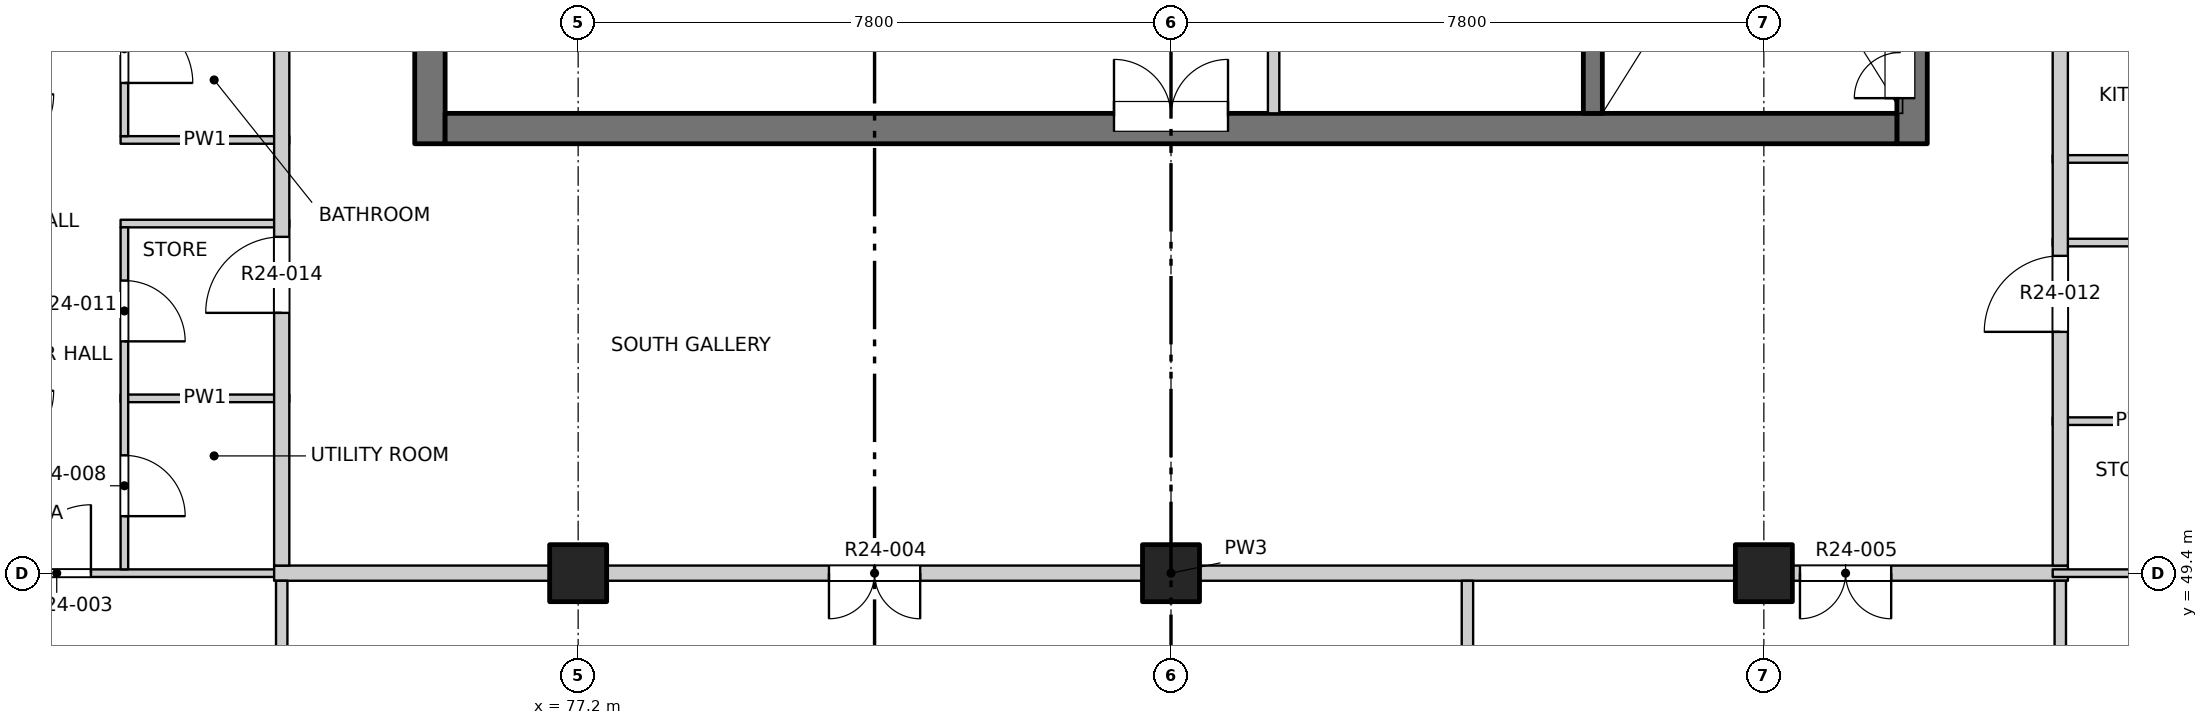
"""IFC4 building model, lengths in metres.
Left out: names, types, materials, properties, quantities, classifications, styles, units other than length and angle.
Written with IfcOpenShell. Run it as: python <this file> out.ifc"""

import sys

from ifc_helpers import new_model, si_unit, direction, frame, frame_2d, origin, origin_2d, place, context, subcontext, project, spatial, rectangle, extrude, element, fill, save


model = new_model("IFC4")
c1 = context("Model", 3, precision=1e-05, world=origin(), true_north=direction((0.0, 1.0)))
c2 = subcontext(c1, "Body", "Model", "MODEL_VIEW")
j1 = project(units=[si_unit("LENGTHUNIT", "METRE"), si_unit("PLANEANGLEUNIT", "RADIAN")], contexts=[c1])
p1 = place(None, origin())
s1 = spatial("IfcSite", under=j1, at=p1, CompositionType="ELEMENT")
p2 = place(p1, origin())
s2 = spatial("IfcBuilding", under=s1, at=p2, CompositionType="ELEMENT")
p3 = place(p2, frame((0.0, 0.0, 249.4)))
s3 = spatial("IfcBuildingStorey", under=s2, at=p3, CompositionType="ELEMENT", Elevation=249.4)
for number, where, z_axis, x_axis in (
    (1, (77.2, 49.4, -0.25), (0.0, 0.0, 1.0), (1.0, 0.0, 0.0)),
    (2, (85.0, 49.4, -0.25), (0.0, 0.0, 1.0), (1.0, 0.0, 0.0)),
    (3, (92.8, 49.4, -0.25), (0.0, 0.0, 1.0), (1.0, 0.0, 0.0)),
):
    element("IfcColumn", number, at=place(p3, frame(where, z_axis=z_axis, x_axis=x_axis)), inside=s3, PredefinedType="COLUMN", context=c2, shape_type="SweptSolid", body=[
        extrude(rectangle(XDim=0.75, YDim=0.75, at=origin_2d()), origin(), (0.0, 0.0, 1.0), 3.4),
    ])
p4 = place(p3, frame((75.25, 55.05, -0.25), z_axis=(0.0, 0.0, 1.0), x_axis=(0.0, 1.0, 0.0)))
e4 = element("IfcWall", 4, at=p4, inside=s3, PredefinedType="SOLIDWALL", context=c2, shape_type="SweptSolid", body=[
    extrude(rectangle(XDim=22.25, YDim=0.4, at=frame_2d((11.125, 0.0))), origin(), (0.0, 0.0, 1.0), 3.4),
])
p5 = place(p4, frame((7.4, 0.0, 0.25)))
e5 = element("IfcOpeningElement", 5, at=p5, cuts=e4, PredefinedType="OPENING", context=c2, shape_type="SweptSolid", body=[
    extrude(rectangle(XDim=0.9, YDim=2.1, at=frame_2d((0.45, 1.05))), frame((0.0, 0.21, 0.0), z_axis=(0.0, -1.0, 0.0), x_axis=(1.0, 0.0, 0.0)), (0.0, 0.0, 1.0), 0.42),
])
p6 = place(p4, frame((12.05, 0.0, 0.25)))
e6 = element("IfcOpeningElement", 6, at=p6, cuts=e4, PredefinedType="OPENING", context=c2, shape_type="SweptSolid", body=[
    extrude(rectangle(XDim=0.9, YDim=2.1, at=frame_2d((0.45, 1.05))), frame((0.0, 0.21, 0.0), z_axis=(0.0, -1.0, 0.0), x_axis=(1.0, 0.0, 0.0)), (0.0, 0.0, 1.0), 0.42),
])
p7 = place(p4, frame((16.55, 0.0, 0.25)))
e7 = element("IfcOpeningElement", 7, at=p7, cuts=e4, PredefinedType="OPENING", context=c2, shape_type="SweptSolid", body=[
    extrude(rectangle(XDim=0.9, YDim=2.1, at=frame_2d((0.45, 1.05))), frame((0.0, 0.21, 0.0), z_axis=(0.0, -1.0, 0.0), x_axis=(1.0, 0.0, 0.0)), (0.0, 0.0, 1.0), 0.42),
])
p8 = place(p4, frame((20.0, 0.0, 0.25)))
e8 = element("IfcOpeningElement", 8, at=p8, cuts=e4, PredefinedType="OPENING", context=c2, shape_type="SweptSolid", body=[
    extrude(rectangle(XDim=0.9, YDim=2.1, at=frame_2d((0.45, 1.05))), frame((0.0, 0.21, 0.0), z_axis=(0.0, -1.0, 0.0), x_axis=(1.0, 0.0, 0.0)), (0.0, 0.0, 1.0), 0.42),
])
p9 = place(p3, frame((94.75, 55.05, -0.25), z_axis=(0.0, 0.0, 1.0), x_axis=(0.0, 1.0, 0.0)))
e9 = element("IfcWall", 9, at=p9, inside=s3, PredefinedType="SOLIDWALL", context=c2, shape_type="SweptSolid", body=[
    extrude(rectangle(XDim=6.9, YDim=0.4, at=frame_2d((3.45, 0.0))), origin(), (0.0, 0.0, 1.0), 3.4),
])
p10 = place(p9, frame((0.6, 0.0, 0.25)))
e10 = element("IfcOpeningElement", 10, at=p10, cuts=e9, PredefinedType="OPENING", context=c2, shape_type="SweptSolid", body=[
    extrude(rectangle(XDim=1.2, YDim=2.1, at=frame_2d((0.6, 1.05))), frame((0.0, 0.21, 0.0), z_axis=(0.0, -1.0, 0.0), x_axis=(1.0, 0.0, 0.0)), (0.0, 0.0, 1.0), 0.42),
])
p11 = place(p3, frame((75.45, 55.25, -0.25), z_axis=(0.0, 0.0, 1.0), x_axis=(1.0, 0.0, 0.0)))
e11 = element("IfcWall", 11, at=p11, inside=s3, PredefinedType="SOLIDWALL", context=c2, shape_type="SweptSolid", body=[
    extrude(rectangle(XDim=19.1, YDim=0.4, at=frame_2d((9.55, 0.0))), origin(), (0.0, 0.0, 1.0), 3.4),
])
p12 = place(p11, frame((8.8, 0.0, 0.25)))
e12 = element("IfcOpeningElement", 12, at=p12, cuts=e11, PredefinedType="OPENING", context=c2, shape_type="SweptSolid", body=[
    extrude(rectangle(XDim=1.5, YDim=2.1, at=frame_2d((0.75, 1.05))), frame((0.0, 0.21, 0.0), z_axis=(0.0, -1.0, 0.0), x_axis=(1.0, 0.0, 0.0)), (0.0, 0.0, 1.0), 0.42),
])
p13 = place(p3, frame((90.55, 55.45, -0.25), z_axis=(0.0, 0.0, 1.0), x_axis=(0.0, 1.0, 0.0)))
e13 = element("IfcWall", 13, at=p13, inside=s3, PredefinedType="SOLIDWALL", context=c2, shape_type="SweptSolid", body=[
    extrude(rectangle(XDim=6.5, YDim=0.25, at=frame_2d((3.25, 0.0))), origin(), (0.0, 0.0, 1.0), 3.4),
])
p14 = place(p3, frame((65.8, 49.4, 0.0), z_axis=(0.0, 0.0, 1.0), x_axis=(1.0, 0.0, 0.0)))
e14 = element("IfcWall", 14, at=p14, inside=s3, PredefinedType="PARTITIONING", context=c2, shape_type="SweptSolid", body=[
    extrude(rectangle(XDim=7.6, YDim=0.1, at=frame_2d((3.8, 0.0))), origin(), (0.0, 0.0, 1.0), 3.15),
])
p15 = place(p14, frame((4.09, 0.0, 0.0)))
e15 = element("IfcOpeningElement", 15, at=p15, cuts=e14, PredefinedType="OPENING", context=c2, shape_type="SweptSolid", body=[
    extrude(rectangle(XDim=0.9, YDim=2.1, at=frame_2d((0.45, 1.05))), frame((0.0, 0.06, 0.0), z_axis=(0.0, -1.0, 0.0), x_axis=(1.0, 0.0, 0.0)), (0.0, 0.0, 1.0), 0.12),
])
p16 = place(p3, frame((73.2, 49.4, 0.0), z_axis=(0.0, 0.0, 1.0), x_axis=(1.0, 0.0, 0.0)))
e16 = element("IfcWall", 16, at=p16, inside=s3, PredefinedType="PARTITIONING", context=c2, shape_type="SweptSolid", body=[
    extrude(rectangle(XDim=23.6, YDim=0.2, at=frame_2d((11.8, 0.0))), origin(), (0.0, 0.0, 1.0), 3.15),
])
p17 = place(p16, frame((7.3, 0.0, 0.0)))
e17 = element("IfcOpeningElement", 17, at=p17, cuts=e16, PredefinedType="OPENING", context=c2, shape_type="SweptSolid", body=[
    extrude(rectangle(XDim=1.2, YDim=2.1, at=frame_2d((0.6, 1.05))), frame((0.0, 0.11, 0.0), z_axis=(0.0, -1.0, 0.0), x_axis=(1.0, 0.0, 0.0)), (0.0, 0.0, 1.0), 0.22),
])
p18 = place(p16, frame((20.075, 0.0, 0.0)))
e18 = element("IfcOpeningElement", 18, at=p18, cuts=e16, PredefinedType="OPENING", context=c2, shape_type="SweptSolid", body=[
    extrude(rectangle(XDim=1.2, YDim=2.1, at=frame_2d((0.6, 1.05))), frame((0.0, 0.11, 0.0), z_axis=(0.0, -1.0, 0.0), x_axis=(1.0, 0.0, 0.0)), (0.0, 0.0, 1.0), 0.22),
])
p19 = place(p3, frame((96.6, 49.4, 0.0), z_axis=(0.0, 0.0, 1.0), x_axis=(1.0, 0.0, 0.0)))
e19 = element("IfcWall", 19, at=p19, inside=s3, PredefinedType="PARTITIONING", context=c2, shape_type="SweptSolid", body=[
    extrude(rectangle(XDim=7.6, YDim=0.1, at=frame_2d((3.8, 0.0))), origin(), (0.0, 0.0, 1.0), 3.15),
])
p20 = place(p19, frame((2.61, 0.0, 0.0)))
e20 = element("IfcOpeningElement", 20, at=p20, cuts=e19, PredefinedType="OPENING", context=c2, shape_type="SweptSolid", body=[
    extrude(rectangle(XDim=0.9, YDim=2.1, at=frame_2d((0.45, 1.05))), frame((0.0, 0.06, 0.0), z_axis=(0.0, -1.0, 0.0), x_axis=(1.0, 0.0, 0.0)), (0.0, 0.0, 1.0), 0.12),
])
for number, where, z_axis, x_axis in (
    (21, (96.6, 51.4, 0.0), (0.0, 0.0, 1.0), (1.0, 0.0, 0.0)),
    (22, (71.18, 51.7, 0.0), (0.0, 0.0, 1.0), (1.0, 0.0, 0.0)),
    (23, (96.6, 53.75, 0.0), (0.0, 0.0, 1.0), (1.0, 0.0, 0.0)),
    (24, (71.18, 54.0, 0.0), (0.0, 0.0, 1.0), (1.0, 0.0, 0.0)),
    (25, (96.6, 54.85, 0.0), (0.0, 0.0, 1.0), (1.0, 0.0, 0.0)),
    (26, (71.18, 55.1, 0.0), (0.0, 0.0, 1.0), (1.0, 0.0, 0.0)),
):
    element("IfcWall", number, at=place(p3, frame(where, z_axis=z_axis, x_axis=x_axis)), inside=s3, PredefinedType="PARTITIONING", context=c2, shape_type="SweptSolid", body=[
        extrude(rectangle(XDim=2.22, YDim=0.1, at=frame_2d((1.11, 0.0))), origin(), (0.0, 0.0, 1.0), 3.15),
    ])
p21 = place(p3, frame((71.23, 49.45, 0.0), z_axis=(0.0, 0.0, 1.0), x_axis=(0.0, 1.0, 0.0)))
e27 = element("IfcWall", 27, at=p21, inside=s3, PredefinedType="PARTITIONING", context=c2, shape_type="SweptSolid", body=[
    extrude(rectangle(XDim=4.5, YDim=0.1, at=frame_2d((2.25, 0.0))), origin(), (0.0, 0.0, 1.0), 3.15),
])
p22 = place(p21, frame((0.7, 0.0, 0.0)))
e28 = element("IfcOpeningElement", 28, at=p22, cuts=e27, PredefinedType="OPENING", context=c2, shape_type="SweptSolid", body=[
    extrude(rectangle(XDim=0.8, YDim=2.1, at=frame_2d((0.4, 1.05))), frame((0.0, 0.06, 0.0), z_axis=(0.0, -1.0, 0.0), x_axis=(1.0, 0.0, 0.0)), (0.0, 0.0, 1.0), 0.12),
])
p23 = place(p21, frame((3.0, 0.0, 0.0)))
e29 = element("IfcOpeningElement", 29, at=p23, cuts=e27, PredefinedType="OPENING", context=c2, shape_type="SweptSolid", body=[
    extrude(rectangle(XDim=0.8, YDim=2.1, at=frame_2d((0.4, 1.05))), frame((0.0, 0.06, 0.0), z_axis=(0.0, -1.0, 0.0), x_axis=(1.0, 0.0, 0.0)), (0.0, 0.0, 1.0), 0.12),
])
p24 = place(p3, frame((71.23, 55.15, 0.0), z_axis=(0.0, 0.0, 1.0), x_axis=(0.0, 1.0, 0.0)))
e30 = element("IfcWall", 30, at=p24, inside=s3, PredefinedType="PARTITIONING", context=c2, shape_type="SweptSolid", body=[
    extrude(rectangle(XDim=10.9, YDim=0.1, at=frame_2d((5.45, 0.0))), origin(), (0.0, 0.0, 1.0), 3.15),
])
p25 = place(p24, frame((0.7, 0.0, 0.0)))
e31 = element("IfcOpeningElement", 31, at=p25, cuts=e30, PredefinedType="OPENING", context=c2, shape_type="SweptSolid", body=[
    extrude(rectangle(XDim=0.9, YDim=2.1, at=frame_2d((0.45, 1.05))), frame((0.0, 0.06, 0.0), z_axis=(0.0, -1.0, 0.0), x_axis=(1.0, 0.0, 0.0)), (0.0, 0.0, 1.0), 0.12),
])
p26 = place(p24, frame((2.815, 0.0, 0.0)))
e32 = element("IfcOpeningElement", 32, at=p26, cuts=e30, PredefinedType="OPENING", context=c2, shape_type="SweptSolid", body=[
    extrude(rectangle(XDim=0.9, YDim=2.1, at=frame_2d((0.45, 1.05))), frame((0.0, 0.06, 0.0), z_axis=(0.0, -1.0, 0.0), x_axis=(1.0, 0.0, 0.0)), (0.0, 0.0, 1.0), 0.12),
])
p27 = place(p24, frame((5.005, 0.0, 0.0)))
e33 = element("IfcOpeningElement", 33, at=p27, cuts=e30, PredefinedType="OPENING", context=c2, shape_type="SweptSolid", body=[
    extrude(rectangle(XDim=0.8, YDim=2.1, at=frame_2d((0.4, 1.05))), frame((0.0, 0.06, 0.0), z_axis=(0.0, -1.0, 0.0), x_axis=(1.0, 0.0, 0.0)), (0.0, 0.0, 1.0), 0.12),
])
p28 = place(p24, frame((7.79, 0.0, 0.0)))
e34 = element("IfcOpeningElement", 34, at=p28, cuts=e30, PredefinedType="OPENING", context=c2, shape_type="SweptSolid", body=[
    extrude(rectangle(XDim=0.9, YDim=2.1, at=frame_2d((0.45, 1.05))), frame((0.0, 0.06, 0.0), z_axis=(0.0, -1.0, 0.0), x_axis=(1.0, 0.0, 0.0)), (0.0, 0.0, 1.0), 0.12),
])
p29 = place(p24, frame((10.0, 0.0, 0.0)))
e35 = element("IfcOpeningElement", 35, at=p29, cuts=e30, PredefinedType="OPENING", context=c2, shape_type="SweptSolid", body=[
    extrude(rectangle(XDim=0.8, YDim=2.1, at=frame_2d((0.4, 1.05))), frame((0.0, 0.06, 0.0), z_axis=(0.0, -1.0, 0.0), x_axis=(1.0, 0.0, 0.0)), (0.0, 0.0, 1.0), 0.12),
])
p30 = place(p3, frame((73.3, 45.8, 0.0), z_axis=(0.0, 0.0, 1.0), x_axis=(0.0, 1.0, 0.0)))
e36 = element("IfcWall", 36, at=p30, inside=s3, PredefinedType="PARTITIONING", context=c2, shape_type="SweptSolid", body=[
    extrude(rectangle(XDim=3.5, YDim=0.15, at=frame_2d((1.75, 0.0))), origin(), (0.0, 0.0, 1.0), 3.15),
])
p31 = place(p3, frame((73.3, 49.5, 0.0), z_axis=(0.0, 0.0, 1.0), x_axis=(0.0, 1.0, 0.0)))
e37 = element("IfcWall", 37, at=p31, inside=s3, PredefinedType="PARTITIONING", context=c2, shape_type="SweptSolid", body=[
    extrude(rectangle(XDim=34.7, YDim=0.2, at=frame_2d((17.35, 0.0))), origin(), (0.0, 0.0, 1.0), 3.15),
])
p32 = place(p31, frame((3.325, 0.0, 0.0)))
e38 = element("IfcOpeningElement", 38, at=p32, cuts=e37, PredefinedType="OPENING", context=c2, shape_type="SweptSolid", body=[
    extrude(rectangle(XDim=1.0, YDim=2.1, at=frame_2d((0.5, 1.05))), frame((0.0, 0.11, 0.0), z_axis=(0.0, -1.0, 0.0), x_axis=(1.0, 0.0, 0.0)), (0.0, 0.0, 1.0), 0.22),
])
p33 = place(p31, frame((17.875, 0.0, 0.0)))
e39 = element("IfcOpeningElement", 39, at=p33, cuts=e37, PredefinedType="OPENING", context=c2, shape_type="SweptSolid", body=[
    extrude(rectangle(XDim=1.0, YDim=2.1, at=frame_2d((0.5, 1.05))), frame((0.0, 0.11, 0.0), z_axis=(0.0, -1.0, 0.0), x_axis=(1.0, 0.0, 0.0)), (0.0, 0.0, 1.0), 0.22),
])
p34 = place(p31, frame((25.775, 0.0, 0.0)))
e40 = element("IfcOpeningElement", 40, at=p34, cuts=e37, PredefinedType="OPENING", context=c2, shape_type="SweptSolid", body=[
    extrude(rectangle(XDim=1.0, YDim=2.1, at=frame_2d((0.5, 1.05))), frame((0.0, 0.11, 0.0), z_axis=(0.0, -1.0, 0.0), x_axis=(1.0, 0.0, 0.0)), (0.0, 0.0, 1.0), 0.22),
])
p35 = place(p3, frame((86.35, 55.45, 0.0), z_axis=(0.0, 0.0, 1.0), x_axis=(0.0, 1.0, 0.0)))
e41 = element("IfcWall", 41, at=p35, inside=s3, PredefinedType="PARTITIONING", context=c2, shape_type="SweptSolid", body=[
    extrude(rectangle(XDim=5.575, YDim=0.15, at=frame_2d((2.788, 0.0))), origin(), (0.0, 0.0, 1.0), 3.15),
])
p36 = place(p35, frame((2.25, 0.0, 0.0)))
e42 = element("IfcOpeningElement", 42, at=p36, cuts=e41, PredefinedType="OPENING", context=c2, shape_type="SweptSolid", body=[
    extrude(rectangle(XDim=0.9, YDim=2.1, at=frame_2d((0.45, 1.05))), frame((0.0, 0.085, 0.0), z_axis=(0.0, -1.0, 0.0), x_axis=(1.0, 0.0, 0.0)), (0.0, 0.0, 1.0), 0.17),
])
p37 = place(p3, frame((88.9, 45.8, 0.0), z_axis=(0.0, 0.0, 1.0), x_axis=(0.0, 1.0, 0.0)))
e43 = element("IfcWall", 43, at=p37, inside=s3, PredefinedType="PARTITIONING", context=c2, shape_type="SweptSolid", body=[
    extrude(rectangle(XDim=3.5, YDim=0.15, at=frame_2d((1.75, 0.0))), origin(), (0.0, 0.0, 1.0), 2.55),
])
p38 = place(p3, frame((96.7, 45.8, 0.0), z_axis=(0.0, 0.0, 1.0), x_axis=(0.0, 1.0, 0.0)))
e44 = element("IfcWall", 44, at=p38, inside=s3, PredefinedType="PARTITIONING", context=c2, shape_type="SweptSolid", body=[
    extrude(rectangle(XDim=3.5, YDim=0.15, at=frame_2d((1.75, 0.0))), origin(), (0.0, 0.0, 1.0), 3.15),
])
p39 = place(p3, frame((96.7, 49.5, 0.0), z_axis=(0.0, 0.0, 1.0), x_axis=(0.0, 1.0, 0.0)))
e45 = element("IfcWall", 45, at=p39, inside=s3, PredefinedType="PARTITIONING", context=c2, shape_type="SweptSolid", body=[
    extrude(rectangle(XDim=34.7, YDim=0.2, at=frame_2d((17.35, 0.0))), origin(), (0.0, 0.0, 1.0), 3.15),
])
p40 = place(p39, frame((3.075, 0.0, 0.0)))
e46 = element("IfcOpeningElement", 46, at=p40, cuts=e45, PredefinedType="OPENING", context=c2, shape_type="SweptSolid", body=[
    extrude(rectangle(XDim=1.0, YDim=2.1, at=frame_2d((0.5, 1.05))), frame((0.0, 0.11, 0.0), z_axis=(0.0, -1.0, 0.0), x_axis=(1.0, 0.0, 0.0)), (0.0, 0.0, 1.0), 0.22),
])
p41 = place(p39, frame((18.425, 0.0, 0.0)))
e47 = element("IfcOpeningElement", 47, at=p41, cuts=e45, PredefinedType="OPENING", context=c2, shape_type="SweptSolid", body=[
    extrude(rectangle(XDim=1.0, YDim=2.1, at=frame_2d((0.5, 1.05))), frame((0.0, 0.11, 0.0), z_axis=(0.0, -1.0, 0.0), x_axis=(1.0, 0.0, 0.0)), (0.0, 0.0, 1.0), 0.22),
])
p42 = place(p39, frame((25.825, 0.0, 0.0)))
e48 = element("IfcOpeningElement", 48, at=p42, cuts=e45, PredefinedType="OPENING", context=c2, shape_type="SweptSolid", body=[
    extrude(rectangle(XDim=1.0, YDim=2.1, at=frame_2d((0.5, 1.05))), frame((0.0, 0.11, 0.0), z_axis=(0.0, -1.0, 0.0), x_axis=(1.0, 0.0, 0.0)), (0.0, 0.0, 1.0), 0.22),
])
p43 = place(p15, origin())
e49 = element("IfcDoor", 49, at=p43, inside=s3, OperationType="SINGLE_SWING_RIGHT", PredefinedType="DOOR", context=c2, shape_type="SweptSolid", body=[
    extrude(rectangle(XDim=0.9, YDim=2.1, at=frame_2d((0.45, 1.05))), frame((0.0, 0.025, 0.0), z_axis=(0.0, -1.0, 0.0), x_axis=(1.0, 0.0, 0.0)), (0.0, 0.0, 1.0), 0.05),
])
fill(e15, e49)
p44 = place(p17, origin())
e50 = element("IfcDoor", 50, at=p44, inside=s3, OperationType="DOUBLE_DOOR_SINGLE_SWING", PredefinedType="DOOR", context=c2, shape_type="SweptSolid", body=[
    extrude(rectangle(XDim=1.2, YDim=2.1, at=frame_2d((0.6, 1.05))), frame((0.0, 0.025, 0.0), z_axis=(0.0, -1.0, 0.0), x_axis=(1.0, 0.0, 0.0)), (0.0, 0.0, 1.0), 0.05),
])
fill(e17, e50)
p45 = place(p18, origin())
e51 = element("IfcDoor", 51, at=p45, inside=s3, OperationType="DOUBLE_DOOR_SINGLE_SWING", PredefinedType="DOOR", context=c2, shape_type="SweptSolid", body=[
    extrude(rectangle(XDim=1.2, YDim=2.1, at=frame_2d((0.6, 1.05))), frame((0.0, 0.025, 0.0), z_axis=(0.0, -1.0, 0.0), x_axis=(1.0, 0.0, 0.0)), (0.0, 0.0, 1.0), 0.05),
])
fill(e18, e51)
p46 = place(p22, origin())
e52 = element("IfcDoor", 52, at=p46, inside=s3, OperationType="SINGLE_SWING_RIGHT", PredefinedType="DOOR", context=c2, shape_type="SweptSolid", body=[
    extrude(rectangle(XDim=0.8, YDim=2.1, at=frame_2d((0.4, 1.05))), frame((0.0, 0.025, 0.0), z_axis=(0.0, -1.0, 0.0), x_axis=(1.0, 0.0, 0.0)), (0.0, 0.0, 1.0), 0.05),
])
fill(e28, e52)
p47 = place(p23, origin())
e53 = element("IfcDoor", 53, at=p47, inside=s3, OperationType="SINGLE_SWING_RIGHT", PredefinedType="DOOR", context=c2, shape_type="SweptSolid", body=[
    extrude(rectangle(XDim=0.8, YDim=2.1, at=frame_2d((0.4, 1.05))), frame((0.0, 0.025, 0.0), z_axis=(0.0, -1.0, 0.0), x_axis=(1.0, 0.0, 0.0)), (0.0, 0.0, 1.0), 0.05),
])
fill(e29, e53)
p48 = place(p40, origin())
e54 = element("IfcDoor", 54, at=p48, inside=s3, OperationType="SINGLE_SWING_RIGHT", PredefinedType="DOOR", context=c2, shape_type="SweptSolid", body=[
    extrude(rectangle(XDim=1.0, YDim=2.1, at=frame_2d((0.5, 1.05))), frame((0.0, 0.025, 0.0), z_axis=(0.0, -1.0, 0.0), x_axis=(1.0, 0.0, 0.0)), (0.0, 0.0, 1.0), 0.05),
])
fill(e46, e54)
p49 = place(p32, origin())
e55 = element("IfcDoor", 55, at=p49, inside=s3, OperationType="SINGLE_SWING_LEFT", PredefinedType="DOOR", context=c2, shape_type="SweptSolid", body=[
    extrude(rectangle(XDim=1.0, YDim=2.1, at=frame_2d((0.5, 1.05))), frame((0.0, 0.025, 0.0), z_axis=(0.0, -1.0, 0.0), x_axis=(1.0, 0.0, 0.0)), (0.0, 0.0, 1.0), 0.05),
])
fill(e38, e55)
p50 = place(p12, origin())
e56 = element("IfcDoor", 56, at=p50, inside=s3, OperationType="DOUBLE_DOOR_SINGLE_SWING", PredefinedType="DOOR", context=c2, shape_type="SweptSolid", body=[
    extrude(rectangle(XDim=1.5, YDim=2.1, at=frame_2d((0.75, 1.05))), frame((0.0, 0.185, 0.0), z_axis=(0.0, -1.0, 0.0), x_axis=(1.0, 0.0, 0.0)), (0.0, 0.0, 1.0), 0.05),
])
fill(e12, e56)
p51 = place(p10, origin())
e57 = element("IfcDoor", 57, at=p51, inside=s3, OperationType="DOUBLE_DOOR_SINGLE_SWING", PredefinedType="DOOR", context=c2, shape_type="SweptSolid", body=[
    extrude(rectangle(XDim=1.2, YDim=2.1, at=frame_2d((0.6, 1.05))), frame((0.0, 0.185, 0.0), z_axis=(0.0, -1.0, 0.0), x_axis=(1.0, 0.0, 0.0)), (0.0, 0.0, 1.0), 0.05),
])
fill(e10, e57)
p52 = place(p25, origin())
e58 = element("IfcDoor", 58, at=p52, inside=s3, OperationType="SINGLE_SWING_RIGHT", PredefinedType="DOOR", context=c2, shape_type="SweptSolid", body=[
    extrude(rectangle(XDim=0.9, YDim=2.1, at=frame_2d((0.45, 1.05))), frame((0.0, 0.025, 0.0), z_axis=(0.0, -1.0, 0.0), x_axis=(1.0, 0.0, 0.0)), (0.0, 0.0, 1.0), 0.05),
])
fill(e31, e58)
save(model, sys.argv[1])
